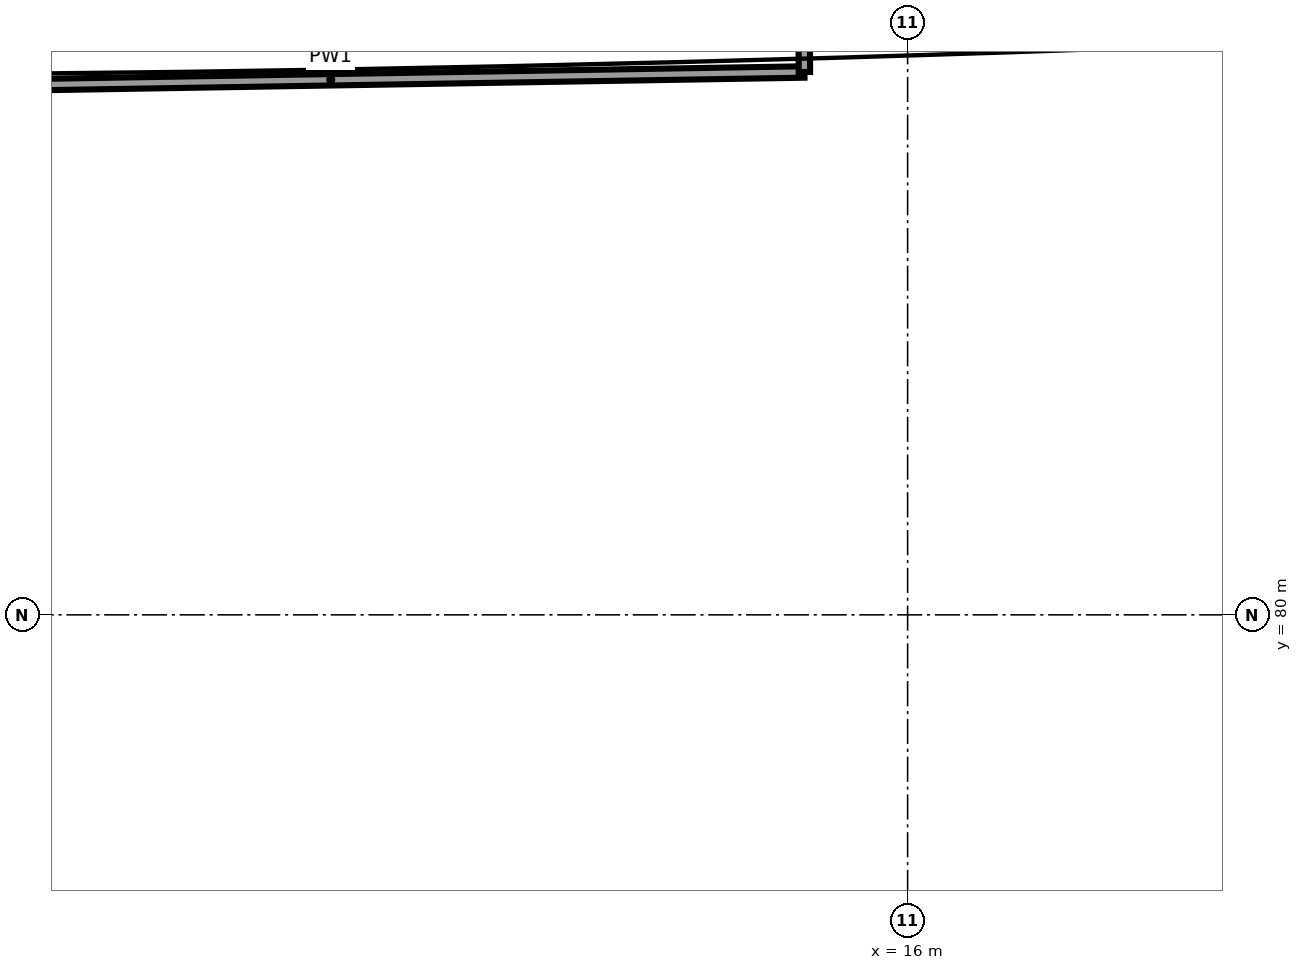
"""IFC4 building model, lengths in metres.
Left out: names, types, materials, properties, quantities, classifications, styles, units other than length and angle.
Written with IfcOpenShell. Run it as: python <this file> out.ifc"""

import sys

from ifc_helpers import new_model, si_unit, direction, frame, frame_2d, origin, place, context, subcontext, project, spatial, rectangle, extrude, element, save


model = new_model("IFC4")
c1 = context("Model", 3, precision=1e-05, world=origin(), true_north=direction((0.0, 1.0)))
c2 = subcontext(c1, "Body", "Model", "MODEL_VIEW")
j1 = project(units=[si_unit("LENGTHUNIT", "METRE"), si_unit("PLANEANGLEUNIT", "RADIAN")], contexts=[c1])
p1 = place(None, origin())
s1 = spatial("IfcSite", under=j1, at=p1, CompositionType="ELEMENT")
p2 = place(p1, origin())
s2 = spatial("IfcBuilding", under=s1, at=p2, CompositionType="ELEMENT")
p3 = place(p2, frame((0.0, 0.0, 24.0)))
s3 = spatial("IfcBuildingStorey", under=s2, at=p3, CompositionType="ELEMENT", Elevation=24.0)
p4 = place(p3, frame((2.178, 86.937, 0.0), z_axis=(0.0, 0.0, 1.0), x_axis=(0.999864668818, 0.016451262841, 0.0)))
e1 = element("IfcWall", 1, at=p4, inside=s3, PredefinedType="PARTITIONING", context=c2, shape_type="SweptSolid", body=[
    extrude(rectangle(XDim=12.466, YDim=0.15, at=frame_2d((6.233, 0.0))), origin(), (0.0, 0.0, 1.0), 5.4),
])
p5 = place(p3, frame((14.642, 87.142, 0.0), z_axis=(0.0, 0.0, 1.0), x_axis=(-0.005639862998, 0.999984095846, 0.0)))
e2 = element("IfcWall", 2, at=p5, inside=s3, PredefinedType="PARTITIONING", context=c2, shape_type="SweptSolid", body=[
    extrude(rectangle(XDim=5.368, YDim=0.15, at=frame_2d((2.684, 0.0))), origin(), (0.0, 0.0, 1.0), 5.4),
])
p6 = place(p5, frame((1.55, 0.0, 0.0)))
e3 = element("IfcOpeningElement", 3, at=p6, cuts=e2, PredefinedType="OPENING", context=c2, shape_type="SweptSolid", body=[
    extrude(rectangle(XDim=1.8, YDim=2.1, at=frame_2d((0.9, 1.05))), frame((0.0, 0.085, 0.0), z_axis=(0.0, -1.0, 0.0), x_axis=(1.0, 0.0, 0.0)), (0.0, 0.0, 1.0), 0.17),
])
save(model, sys.argv[1])
